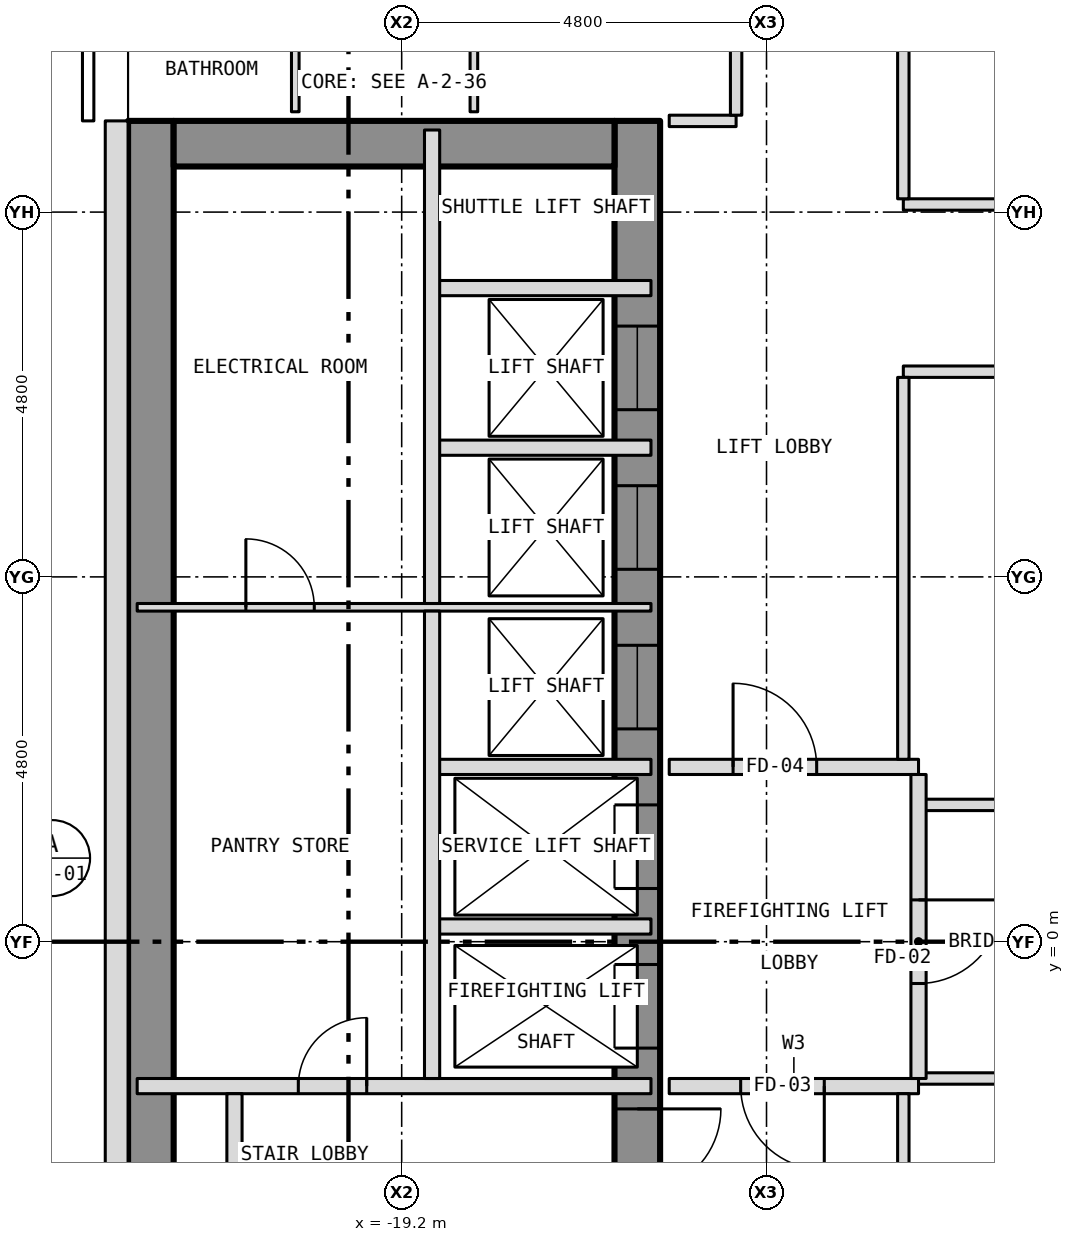
"""IFC4 building model, lengths in metres.
Left out: names, types, materials, properties, quantities, classifications, styles, units other than length and angle.
Written with IfcOpenShell. Run it as: python <this file> out.ifc"""

import sys

from ifc_helpers import new_model, si_unit, direction, frame, frame_2d, origin, place, context, subcontext, project, spatial, rectangle, extrude, element, fill, save


model = new_model("IFC4")
c1 = context("Model", 3, precision=1e-05, world=origin(), true_north=direction((0.0, 1.0)))
c2 = subcontext(c1, "Body", "Model", "MODEL_VIEW")
j1 = project(units=[si_unit("LENGTHUNIT", "METRE"), si_unit("PLANEANGLEUNIT", "RADIAN")], contexts=[c1])
p1 = place(None, origin())
s1 = spatial("IfcSite", under=j1, at=p1, CompositionType="ELEMENT")
p2 = place(p1, origin())
s2 = spatial("IfcBuilding", under=s1, at=p2, CompositionType="ELEMENT")
p3 = place(p2, frame((0.0, 0.0, 131.0)))
s3 = spatial("IfcBuildingStorey", under=s2, at=p3, CompositionType="ELEMENT", Elevation=131.0)
p4 = place(p3, frame((-16.1, -10.8, 0.0), z_axis=(0.0, 0.0, 1.0), x_axis=(0.0, 1.0, 0.0)))
e1 = element("IfcWall", 1, at=p4, inside=s3, PredefinedType="SHEAR", context=c2, shape_type="SweptSolid", body=[
    extrude(rectangle(XDim=21.6, YDim=0.6, at=frame_2d((10.8, 0.0))), origin(), (0.0, 0.0, 1.0), 3.25),
])
p5 = place(p4, frame((9.4, 0.0, 0.0)))
e2 = element("IfcOpeningElement", 2, at=p5, cuts=e1, PredefinedType="OPENING", context=c2, shape_type="SweptSolid", body=[
    extrude(rectangle(XDim=1.1, YDim=2.1, at=frame_2d((0.55, 1.05))), frame((0.0, 0.312, 0.0), z_axis=(0.0, -1.0, 0.0), x_axis=(1.0, 0.0, 0.0)), (0.0, 0.0, 1.0), 0.624),
])
p6 = place(p4, frame((11.5, 0.0, 0.0)))
e3 = element("IfcOpeningElement", 3, at=p6, cuts=e1, PredefinedType="OPENING", context=c2, shape_type="SweptSolid", body=[
    extrude(rectangle(XDim=1.1, YDim=2.1, at=frame_2d((0.55, 1.05))), frame((0.0, 0.312, 0.0), z_axis=(0.0, -1.0, 0.0), x_axis=(1.0, 0.0, 0.0)), (0.0, 0.0, 1.0), 0.624),
])
p7 = place(p4, frame((13.6, 0.0, 0.0)))
e4 = element("IfcOpeningElement", 4, at=p7, cuts=e1, PredefinedType="OPENING", context=c2, shape_type="SweptSolid", body=[
    extrude(rectangle(XDim=1.1, YDim=2.1, at=frame_2d((0.55, 1.05))), frame((0.0, 0.312, 0.0), z_axis=(0.0, -1.0, 0.0), x_axis=(1.0, 0.0, 0.0)), (0.0, 0.0, 1.0), 0.624),
])
p8 = place(p4, frame((15.7, 0.0, 0.0)))
e5 = element("IfcOpeningElement", 5, at=p8, cuts=e1, PredefinedType="OPENING", context=c2, shape_type="SweptSolid", body=[
    extrude(rectangle(XDim=1.1, YDim=2.1, at=frame_2d((0.55, 1.05))), frame((0.0, 0.312, 0.0), z_axis=(0.0, -1.0, 0.0), x_axis=(1.0, 0.0, 0.0)), (0.0, 0.0, 1.0), 0.624),
])
p9 = place(p4, frame((17.8, 0.0, 0.0)))
e6 = element("IfcOpeningElement", 6, at=p9, cuts=e1, PredefinedType="OPENING", context=c2, shape_type="SweptSolid", body=[
    extrude(rectangle(XDim=1.1, YDim=2.1, at=frame_2d((0.55, 1.05))), frame((0.0, 0.312, 0.0), z_axis=(0.0, -1.0, 0.0), x_axis=(1.0, 0.0, 0.0)), (0.0, 0.0, 1.0), 0.624),
])
p10 = place(p4, frame((0.758, 0.0, 0.0)))
e7 = element("IfcOpeningElement", 7, at=p10, cuts=e1, PredefinedType="OPENING", context=c2, shape_type="SweptSolid", body=[
    extrude(rectangle(XDim=1.1, YDim=2.1, at=frame_2d((0.55, 1.05))), frame((0.0, 0.312, 0.0), z_axis=(0.0, -1.0, 0.0), x_axis=(1.0, 0.0, 0.0)), (0.0, 0.0, 1.0), 0.624),
])
p11 = place(p4, frame((7.5, 0.0, 0.0)))
e8 = element("IfcOpeningElement", 8, at=p11, cuts=e1, PredefinedType="OPENING", context=c2, shape_type="SweptSolid", body=[
    extrude(rectangle(XDim=1.1, YDim=2.1, at=frame_2d((0.55, 1.05))), frame((0.0, 0.312, 0.0), z_axis=(0.0, -1.0, 0.0), x_axis=(1.0, 0.0, 0.0)), (0.0, 0.0, 1.0), 0.624),
])
p12 = place(p3, frame((-22.5, -10.8, 0.0), z_axis=(0.0, 0.0, 1.0), x_axis=(0.0, 1.0, 0.0)))
e9 = element("IfcWall", 9, at=p12, inside=s3, PredefinedType="SHEAR", context=c2, shape_type="SweptSolid", body=[
    extrude(rectangle(XDim=21.6, YDim=0.6, at=frame_2d((10.8, 0.0))), origin(), (0.0, 0.0, 1.0), 3.25),
])
p13 = place(p3, frame((-22.2, 10.5, 0.0), z_axis=(0.0, 0.0, 1.0), x_axis=(1.0, 0.0, 0.0)))
e10 = element("IfcWall", 10, at=p13, inside=s3, PredefinedType="SHEAR", context=c2, shape_type="SweptSolid", body=[
    extrude(rectangle(XDim=5.8, YDim=0.6, at=frame_2d((2.9, 0.0))), origin(), (0.0, 0.0, 1.0), 3.25),
])
p14 = place(p3, frame((-22.95, 10.8, 0.0), z_axis=(0.0, 0.0, 1.0), x_axis=(0.0, -1.0, 0.0)))
e11 = element("IfcWall", 11, at=p14, inside=s3, PredefinedType="SOLIDWALL", context=c2, shape_type="SweptSolid", body=[
    extrude(rectangle(XDim=21.6, YDim=0.3, at=frame_2d((10.8, 0.0))), origin(), (0.0, 0.0, 1.0), 3.5),
])
p15 = place(p14, frame((18.05, 0.0, 1.0)))
e12 = element("IfcOpeningElement", 12, at=p15, cuts=e11, PredefinedType="OPENING", context=c2, shape_type="SweptSolid", body=[
    extrude(rectangle(XDim=0.6, YDim=1.5, at=frame_2d((0.3, 0.75))), frame((0.0, 0.162, 0.0), z_axis=(0.0, -1.0, 0.0), x_axis=(1.0, 0.0, 0.0)), (0.0, 0.0, 1.0), 0.324),
])
p16 = place(p3, frame((-22.68, -1.9, 0.0), z_axis=(0.0, 0.0, 1.0), x_axis=(1.0, 0.0, 0.0)))
e13 = element("IfcWall", 13, at=p16, inside=s3, PredefinedType="PARTITIONING", context=c2, shape_type="SweptSolid", body=[
    extrude(rectangle(XDim=6.76, YDim=0.2, at=frame_2d((3.38, 0.0))), origin(), (0.0, 0.0, 1.0), 3.25),
])
p17 = place(p16, frame((2.12, 0.0, 0.0)))
e14 = element("IfcOpeningElement", 14, at=p17, cuts=e13, PredefinedType="OPENING", context=c2, shape_type="SweptSolid", body=[
    extrude(rectangle(XDim=0.9, YDim=2.1, at=frame_2d((0.45, 1.05))), frame((0.0, 0.112, 0.0), z_axis=(0.0, -1.0, 0.0), x_axis=(1.0, 0.0, 0.0)), (0.0, 0.0, 1.0), 0.224),
])
p18 = place(p3, frame((-15.68, -1.9, 0.0), z_axis=(0.0, 0.0, 1.0), x_axis=(1.0, 0.0, 0.0)))
e15 = element("IfcWall", 15, at=p18, inside=s3, PredefinedType="PARTITIONING", context=c2, shape_type="SweptSolid", body=[
    extrude(rectangle(XDim=3.28, YDim=0.2, at=frame_2d((1.64, 0.0))), origin(), (0.0, 0.0, 1.0), 3.35),
])
p19 = place(p18, frame((0.94, 0.0, 0.0)))
e16 = element("IfcOpeningElement", 16, at=p19, cuts=e15, PredefinedType="OPENING", context=c2, shape_type="SweptSolid", body=[
    extrude(rectangle(XDim=1.1, YDim=2.1, at=frame_2d((0.55, 1.05))), frame((0.0, 0.112, 0.0), z_axis=(0.0, -1.0, 0.0), x_axis=(1.0, 0.0, 0.0)), (0.0, 0.0, 1.0), 0.224),
])
p20 = place(p3, frame((-12.4, -1.8, 0.0), z_axis=(0.0, 0.0, 1.0), x_axis=(1.0, 0.0, 0.0)))
e17 = element("IfcWall", 17, at=p20, inside=s3, PredefinedType="PARTITIONING", context=c2, shape_type="SweptSolid", body=[
    extrude(rectangle(XDim=4.48, YDim=0.15, at=frame_2d((2.24, 0.0))), origin(), (0.0, 0.0, 1.0), 3.35),
])
p21 = place(p3, frame((-18.8, 0.2, 0.0), z_axis=(0.0, 0.0, 1.0), x_axis=(1.0, 0.0, 0.0)))
e18 = element("IfcWall", 18, at=p21, inside=s3, PredefinedType="PARTITIONING", context=c2, shape_type="SweptSolid", body=[
    extrude(rectangle(XDim=2.88, YDim=0.2, at=frame_2d((1.44, 0.0))), origin(), (0.0, 0.0, 1.0), 3.25),
])
p22 = place(p3, frame((-12.4, 1.8, 0.0), z_axis=(0.0, 0.0, 1.0), x_axis=(1.0, 0.0, 0.0)))
e19 = element("IfcWall", 19, at=p22, inside=s3, PredefinedType="PARTITIONING", context=c2, shape_type="SweptSolid", body=[
    extrude(rectangle(XDim=4.48, YDim=0.15, at=frame_2d((2.24, 0.0))), origin(), (0.0, 0.0, 1.0), 3.35),
])
p23 = place(p3, frame((-18.8, 2.3, 0.0), z_axis=(0.0, 0.0, 1.0), x_axis=(1.0, 0.0, 0.0)))
e20 = element("IfcWall", 20, at=p23, inside=s3, PredefinedType="PARTITIONING", context=c2, shape_type="SweptSolid", body=[
    extrude(rectangle(XDim=2.88, YDim=0.2, at=frame_2d((1.44, 0.0))), origin(), (0.0, 0.0, 1.0), 3.25),
])
p24 = place(p3, frame((-15.68, 2.3, 0.0), z_axis=(0.0, 0.0, 1.0), x_axis=(1.0, 0.0, 0.0)))
e21 = element("IfcWall", 21, at=p24, inside=s3, PredefinedType="PARTITIONING", context=c2, shape_type="SweptSolid", body=[
    extrude(rectangle(XDim=3.28, YDim=0.2, at=frame_2d((1.64, 0.0))), origin(), (0.0, 0.0, 1.0), 3.35),
])
p25 = place(p24, frame((0.84, 0.0, 0.0)))
e22 = element("IfcOpeningElement", 22, at=p25, cuts=e21, PredefinedType="OPENING", context=c2, shape_type="SweptSolid", body=[
    extrude(rectangle(XDim=1.1, YDim=2.1, at=frame_2d((0.55, 1.05))), frame((0.0, 0.112, 0.0), z_axis=(0.0, -1.0, 0.0), x_axis=(1.0, 0.0, 0.0)), (0.0, 0.0, 1.0), 0.224),
])
p26 = place(p3, frame((-22.68, 4.4, 0.0), z_axis=(0.0, 0.0, 1.0), x_axis=(1.0, 0.0, 0.0)))
e23 = element("IfcWall", 23, at=p26, inside=s3, PredefinedType="PARTITIONING", context=c2, shape_type="SweptSolid", body=[
    extrude(rectangle(XDim=6.76, YDim=0.1, at=frame_2d((3.38, 0.0))), origin(), (0.0, 0.0, 1.0), 3.25),
])
p27 = place(p26, frame((1.43, 0.0, 0.0)))
e24 = element("IfcOpeningElement", 24, at=p27, cuts=e23, PredefinedType="OPENING", context=c2, shape_type="SweptSolid", body=[
    extrude(rectangle(XDim=0.9, YDim=2.1, at=frame_2d((0.45, 1.05))), frame((0.0, 0.062, 0.0), z_axis=(0.0, -1.0, 0.0), x_axis=(1.0, 0.0, 0.0)), (0.0, 0.0, 1.0), 0.124),
])
p28 = place(p3, frame((-18.8, 6.5, 0.0), z_axis=(0.0, 0.0, 1.0), x_axis=(1.0, 0.0, 0.0)))
e25 = element("IfcWall", 25, at=p28, inside=s3, PredefinedType="PARTITIONING", context=c2, shape_type="SweptSolid", body=[
    extrude(rectangle(XDim=2.88, YDim=0.2, at=frame_2d((1.44, 0.0))), origin(), (0.0, 0.0, 1.0), 3.25),
])
p29 = place(p3, frame((-12.6, 7.5, 0.0), z_axis=(0.0, 0.0, 1.0), x_axis=(1.0, 0.0, 0.0)))
e26 = element("IfcWall", 26, at=p29, inside=s3, PredefinedType="PARTITIONING", context=c2, shape_type="SweptSolid", body=[
    extrude(rectangle(XDim=4.68, YDim=0.15, at=frame_2d((2.34, 0.0))), origin(), (0.0, 0.0, 1.0), 3.35),
])
p30 = place(p29, frame((1.875, 0.0, 0.0)))
e27 = element("IfcOpeningElement", 27, at=p30, cuts=e26, PredefinedType="OPENING", context=c2, shape_type="SweptSolid", body=[
    extrude(rectangle(XDim=0.9, YDim=2.1, at=frame_2d((0.45, 1.05))), frame((0.0, 0.087, 0.0), z_axis=(0.0, -1.0, 0.0), x_axis=(1.0, 0.0, 0.0)), (0.0, 0.0, 1.0), 0.174),
])
p31 = place(p3, frame((-18.8, 8.6, 0.0), z_axis=(0.0, 0.0, 1.0), x_axis=(1.0, 0.0, 0.0)))
e28 = element("IfcWall", 28, at=p31, inside=s3, PredefinedType="PARTITIONING", context=c2, shape_type="SweptSolid", body=[
    extrude(rectangle(XDim=2.88, YDim=0.2, at=frame_2d((1.44, 0.0))), origin(), (0.0, 0.0, 1.0), 3.25),
])
p32 = place(p3, frame((-12.6, 9.7, 0.0), z_axis=(0.0, 0.0, 1.0), x_axis=(1.0, 0.0, 0.0)))
e29 = element("IfcWall", 29, at=p32, inside=s3, PredefinedType="PARTITIONING", context=c2, shape_type="SweptSolid", body=[
    extrude(rectangle(XDim=2.801, YDim=0.15, at=frame_2d((1.4, 0.0))), origin(), (0.0, 0.0, 1.0), 2.728),
])
p33 = place(p32, frame((1.275, 0.0, 0.0)))
e30 = element("IfcOpeningElement", 30, at=p33, cuts=e29, PredefinedType="OPENING", context=c2, shape_type="SweptSolid", body=[
    extrude(rectangle(XDim=0.9, YDim=2.1, at=frame_2d((0.45, 1.05))), frame((0.0, 0.087, 0.0), z_axis=(0.0, -1.0, 0.0), x_axis=(1.0, 0.0, 0.0)), (0.0, 0.0, 1.0), 0.174),
])
p34 = place(p3, frame((-15.68, 10.8, 0.0), z_axis=(0.0, 0.0, 1.0), x_axis=(1.0, 0.0, 0.0)))
e31 = element("IfcWall", 31, at=p34, inside=s3, PredefinedType="PARTITIONING", context=c2, shape_type="SweptSolid", body=[
    extrude(rectangle(XDim=0.88, YDim=0.15, at=frame_2d((0.44, 0.0))), origin(), (0.0, 0.0, 1.0), 3.35),
])
p35 = place(p3, frame((-21.4, -10.68, 0.0), z_axis=(0.0, 0.0, 1.0), x_axis=(0.0, 1.0, 0.0)))
e32 = element("IfcWall", 32, at=p35, inside=s3, PredefinedType="PARTITIONING", context=c2, shape_type="SweptSolid", body=[
    extrude(rectangle(XDim=8.68, YDim=0.2, at=frame_2d((4.34, 0.0))), origin(), (0.0, 0.0, 1.0), 3.25),
])
p36 = place(p35, frame((1.21, 0.0, 0.0)))
e33 = element("IfcOpeningElement", 33, at=p36, cuts=e32, PredefinedType="OPENING", context=c2, shape_type="SweptSolid", body=[
    extrude(rectangle(XDim=0.9, YDim=2.1, at=frame_2d((0.45, 1.05))), frame((0.0, 0.112, 0.0), z_axis=(0.0, -1.0, 0.0), x_axis=(1.0, 0.0, 0.0)), (0.0, 0.0, 1.0), 0.224),
])
p37 = place(p35, frame((5.66, 0.0, 0.0)))
e34 = element("IfcOpeningElement", 34, at=p37, cuts=e32, PredefinedType="OPENING", context=c2, shape_type="SweptSolid", body=[
    extrude(rectangle(XDim=0.9, YDim=2.1, at=frame_2d((0.45, 1.05))), frame((0.0, 0.112, 0.0), z_axis=(0.0, -1.0, 0.0), x_axis=(1.0, 0.0, 0.0)), (0.0, 0.0, 1.0), 0.224),
])
p38 = place(p3, frame((-20.6, 10.92, 0.0), z_axis=(0.0, 0.0, 1.0), x_axis=(0.0, 1.0, 0.0)))
e35 = element("IfcWall", 35, at=p38, inside=s3, PredefinedType="PARTITIONING", context=c2, shape_type="SweptSolid", body=[
    extrude(rectangle(XDim=3.03, YDim=0.1, at=frame_2d((1.515, 0.0))), origin(), (0.0, 0.0, 1.0), 3.35),
])
p39 = place(p38, frame((1.67, 0.0, 0.0)))
e36 = element("IfcOpeningElement", 36, at=p39, cuts=e35, PredefinedType="OPENING", context=c2, shape_type="SweptSolid", body=[
    extrude(rectangle(XDim=0.9, YDim=2.1, at=frame_2d((0.45, 1.05))), frame((0.0, 0.062, 0.0), z_axis=(0.0, -1.0, 0.0), x_axis=(1.0, 0.0, 0.0)), (0.0, 0.0, 1.0), 0.124),
])
p40 = place(p3, frame((-18.8, -1.8, 0.0), z_axis=(0.0, 0.0, 1.0), x_axis=(0.0, 1.0, 0.0)))
e37 = element("IfcWall", 37, at=p40, inside=s3, PredefinedType="PARTITIONING", context=c2, shape_type="SweptSolid", body=[
    extrude(rectangle(XDim=6.15, YDim=0.2, at=frame_2d((3.075, 0.0))), origin(), (0.0, 0.0, 1.0), 3.25),
])
p41 = place(p3, frame((-18.8, 4.45, 0.0), z_axis=(0.0, 0.0, 1.0), x_axis=(0.0, 1.0, 0.0)))
e38 = element("IfcWall", 38, at=p41, inside=s3, PredefinedType="PARTITIONING", context=c2, shape_type="SweptSolid", body=[
    extrude(rectangle(XDim=6.23, YDim=0.2, at=frame_2d((3.115, 0.0))), origin(), (0.0, 0.0, 1.0), 3.25),
])
p42 = place(p3, frame((-18.25, 10.92, 0.0), z_axis=(0.0, 0.0, 1.0), x_axis=(0.0, 1.0, 0.0)))
e39 = element("IfcWall", 39, at=p42, inside=s3, PredefinedType="PARTITIONING", context=c2, shape_type="SweptSolid", body=[
    extrude(rectangle(XDim=7.271, YDim=0.1, at=frame_2d((3.635, 0.0))), origin(), (0.0, 0.0, 1.0), 3.35),
])
p43 = place(p42, frame((5.43, 0.0, 0.0)))
e40 = element("IfcOpeningElement", 40, at=p43, cuts=e39, PredefinedType="OPENING", context=c2, shape_type="SweptSolid", body=[
    extrude(rectangle(XDim=0.9, YDim=2.1, at=frame_2d((0.45, 1.05))), frame((0.0, 0.062, 0.0), z_axis=(0.0, -1.0, 0.0), x_axis=(1.0, 0.0, 0.0)), (0.0, 0.0, 1.0), 0.124),
])
p44 = place(p3, frame((-14.8, 10.875, 0.0), z_axis=(0.0, 0.0, 1.0), x_axis=(0.0, 1.0, 0.0)))
e41 = element("IfcWall", 41, at=p44, inside=s3, PredefinedType="PARTITIONING", context=c2, shape_type="SweptSolid", body=[
    extrude(rectangle(XDim=3.85, YDim=0.15, at=frame_2d((1.925, 0.0))), origin(), (0.0, 0.0, 1.0), 3.35),
])
p45 = place(p44, frame((2.325, 0.0, 0.0)))
e42 = element("IfcOpeningElement", 42, at=p45, cuts=e41, PredefinedType="OPENING", context=c2, shape_type="SweptSolid", body=[
    extrude(rectangle(XDim=1.0, YDim=2.1, at=frame_2d((0.5, 1.05))), frame((0.0, 0.087, 0.0), z_axis=(0.0, -1.0, 0.0), x_axis=(1.0, 0.0, 0.0)), (0.0, 0.0, 1.0), 0.174),
])
p46 = place(p3, frame((-12.6, -12.525, 0.0), z_axis=(0.0, 0.0, 1.0), x_axis=(0.0, 1.0, 0.0)))
e43 = element("IfcWall", 43, at=p46, inside=s3, PredefinedType="PARTITIONING", context=c2, shape_type="SweptSolid", body=[
    extrude(rectangle(XDim=10.525, YDim=0.15, at=frame_2d((5.262, 0.0))), origin(), (0.0, 0.0, 1.0), 3.35),
])
p47 = place(p46, frame((4.825, 0.0, 0.0)))
e44 = element("IfcOpeningElement", 44, at=p47, cuts=e43, PredefinedType="OPENING", context=c2, shape_type="SweptSolid", body=[
    extrude(rectangle(XDim=0.9, YDim=2.1, at=frame_2d((0.45, 1.05))), frame((0.0, 0.087, 0.0), z_axis=(0.0, -1.0, 0.0), x_axis=(1.0, 0.0, 0.0)), (0.0, 0.0, 1.0), 0.174),
])
p48 = place(p3, frame((-12.6, 2.4, 0.0), z_axis=(0.0, 0.0, 1.0), x_axis=(0.0, 1.0, 0.0)))
e45 = element("IfcWall", 45, at=p48, inside=s3, PredefinedType="PARTITIONING", context=c2, shape_type="SweptSolid", body=[
    extrude(rectangle(XDim=5.025, YDim=0.15, at=frame_2d((2.513, 0.0))), origin(), (0.0, 0.0, 1.0), 3.35),
])
p49 = place(p3, frame((-12.6, 9.775, 0.0), z_axis=(0.0, 0.0, 1.0), x_axis=(0.0, 1.0, 0.0)))
e46 = element("IfcWall", 46, at=p49, inside=s3, PredefinedType="PARTITIONING", context=c2, shape_type="SweptSolid", body=[
    extrude(rectangle(XDim=2.75, YDim=0.15, at=frame_2d((1.375, 0.0))), origin(), (0.0, 0.0, 1.0), 3.35),
])
p50 = place(p3, frame((-12.4, -1.8, 0.0), z_axis=(0.0, 0.0, 1.0), x_axis=(0.0, 1.0, 0.0)))
e47 = element("IfcWall", 47, at=p50, inside=s3, PredefinedType="PARTITIONING", context=c2, shape_type="SweptSolid", body=[
    extrude(rectangle(XDim=4.0, YDim=0.2, at=frame_2d((2.0, 0.0))), origin(), (0.0, 0.0, 1.0), 3.35),
])
p51 = place(p50, frame((1.25, 0.0, 0.0)))
e48 = element("IfcOpeningElement", 48, at=p51, cuts=e47, PredefinedType="OPENING", context=c2, shape_type="SweptSolid", body=[
    extrude(rectangle(XDim=1.1, YDim=2.1, at=frame_2d((0.55, 1.05))), frame((0.0, 0.112, 0.0), z_axis=(0.0, -1.0, 0.0), x_axis=(1.0, 0.0, 0.0)), (0.0, 0.0, 1.0), 0.224),
])
p52 = place(p5, origin())
e49 = element("IfcDoor", 49, at=p52, inside=s3, OperationType="SLIDING_TO_LEFT", PredefinedType="DOOR", context=c2, shape_type="SweptSolid", body=[
    extrude(rectangle(XDim=1.1, YDim=2.1, at=frame_2d((0.55, 1.05))), frame((0.0, 0.025, 0.0), z_axis=(0.0, -1.0, 0.0), x_axis=(1.0, 0.0, 0.0)), (0.0, 0.0, 1.0), 0.05),
])
fill(e2, e49)
p53 = place(p6, origin())
e50 = element("IfcDoor", 50, at=p53, inside=s3, OperationType="SLIDING_TO_LEFT", PredefinedType="DOOR", context=c2, shape_type="SweptSolid", body=[
    extrude(rectangle(XDim=1.1, YDim=2.1, at=frame_2d((0.55, 1.05))), frame((0.0, 0.025, 0.0), z_axis=(0.0, -1.0, 0.0), x_axis=(1.0, 0.0, 0.0)), (0.0, 0.0, 1.0), 0.05),
])
fill(e3, e50)
p54 = place(p7, origin())
e51 = element("IfcDoor", 51, at=p54, inside=s3, OperationType="SLIDING_TO_LEFT", PredefinedType="DOOR", context=c2, shape_type="SweptSolid", body=[
    extrude(rectangle(XDim=1.1, YDim=2.1, at=frame_2d((0.55, 1.05))), frame((0.0, 0.025, 0.0), z_axis=(0.0, -1.0, 0.0), x_axis=(1.0, 0.0, 0.0)), (0.0, 0.0, 1.0), 0.05),
])
fill(e4, e51)
p55 = place(p8, origin())
e52 = element("IfcDoor", 52, at=p55, inside=s3, OperationType="SLIDING_TO_LEFT", PredefinedType="DOOR", context=c2, shape_type="SweptSolid", body=[
    extrude(rectangle(XDim=1.1, YDim=2.1, at=frame_2d((0.55, 1.05))), frame((0.0, 0.025, 0.0), z_axis=(0.0, -1.0, 0.0), x_axis=(1.0, 0.0, 0.0)), (0.0, 0.0, 1.0), 0.05),
])
fill(e5, e52)
p56 = place(p9, origin())
e53 = element("IfcDoor", 53, at=p56, inside=s3, OperationType="SLIDING_TO_LEFT", PredefinedType="DOOR", context=c2, shape_type="SweptSolid", body=[
    extrude(rectangle(XDim=1.1, YDim=2.1, at=frame_2d((0.55, 1.05))), frame((0.0, 0.025, 0.0), z_axis=(0.0, -1.0, 0.0), x_axis=(1.0, 0.0, 0.0)), (0.0, 0.0, 1.0), 0.05),
])
fill(e6, e53)
p57 = place(p11, origin())
e54 = element("IfcDoor", 54, at=p57, inside=s3, OperationType="SINGLE_SWING_RIGHT", PredefinedType="DOOR", context=c2, shape_type="SweptSolid", body=[
    extrude(rectangle(XDim=1.1, YDim=2.1, at=frame_2d((0.55, 1.05))), frame((0.0, 0.025, 0.0), z_axis=(0.0, -1.0, 0.0), x_axis=(1.0, 0.0, 0.0)), (0.0, 0.0, 1.0), 0.05),
])
fill(e8, e54)
p58 = place(p17, origin())
e55 = element("IfcDoor", 55, at=p58, inside=s3, OperationType="SINGLE_SWING_RIGHT", PredefinedType="DOOR", context=c2, shape_type="SweptSolid", body=[
    extrude(rectangle(XDim=0.9, YDim=2.1, at=frame_2d((0.45, 1.05))), frame((0.0, 0.025, 0.0), z_axis=(0.0, -1.0, 0.0), x_axis=(1.0, 0.0, 0.0)), (0.0, 0.0, 1.0), 0.05),
])
fill(e14, e55)
p59 = place(p27, origin())
e56 = element("IfcDoor", 56, at=p59, inside=s3, OperationType="SINGLE_SWING_LEFT", PredefinedType="DOOR", context=c2, shape_type="SweptSolid", body=[
    extrude(rectangle(XDim=0.9, YDim=2.1, at=frame_2d((0.45, 1.05))), frame((0.0, 0.025, 0.0), z_axis=(0.0, -1.0, 0.0), x_axis=(1.0, 0.0, 0.0)), (0.0, 0.0, 1.0), 0.05),
])
fill(e24, e56)
p60 = place(p51, origin())
e57 = element("IfcDoor", 57, at=p60, inside=s3, OperationType="SINGLE_SWING_RIGHT", PredefinedType="DOOR", context=c2, shape_type="SweptSolid", body=[
    extrude(rectangle(XDim=1.1, YDim=2.1, at=frame_2d((0.55, 1.05))), frame((0.0, 0.025, 0.0), z_axis=(0.0, -1.0, 0.0), x_axis=(1.0, 0.0, 0.0)), (0.0, 0.0, 1.0), 0.05),
])
fill(e48, e57)
p61 = place(p19, origin())
e58 = element("IfcDoor", 58, at=p61, inside=s3, OperationType="SINGLE_SWING_RIGHT", PredefinedType="DOOR", context=c2, shape_type="SweptSolid", body=[
    extrude(rectangle(XDim=1.1, YDim=2.1, at=frame_2d((0.55, 1.05))), frame((0.0, 0.025, 0.0), z_axis=(0.0, -1.0, 0.0), x_axis=(1.0, 0.0, 0.0)), (0.0, 0.0, 1.0), 0.05),
])
fill(e16, e58)
p62 = place(p25, origin())
e59 = element("IfcDoor", 59, at=p62, inside=s3, OperationType="SINGLE_SWING_LEFT", PredefinedType="DOOR", context=c2, shape_type="SweptSolid", body=[
    extrude(rectangle(XDim=1.1, YDim=2.1, at=frame_2d((0.55, 1.05))), frame((0.0, 0.025, 0.0), z_axis=(0.0, -1.0, 0.0), x_axis=(1.0, 0.0, 0.0)), (0.0, 0.0, 1.0), 0.05),
])
fill(e22, e59)
save(model, sys.argv[1])
